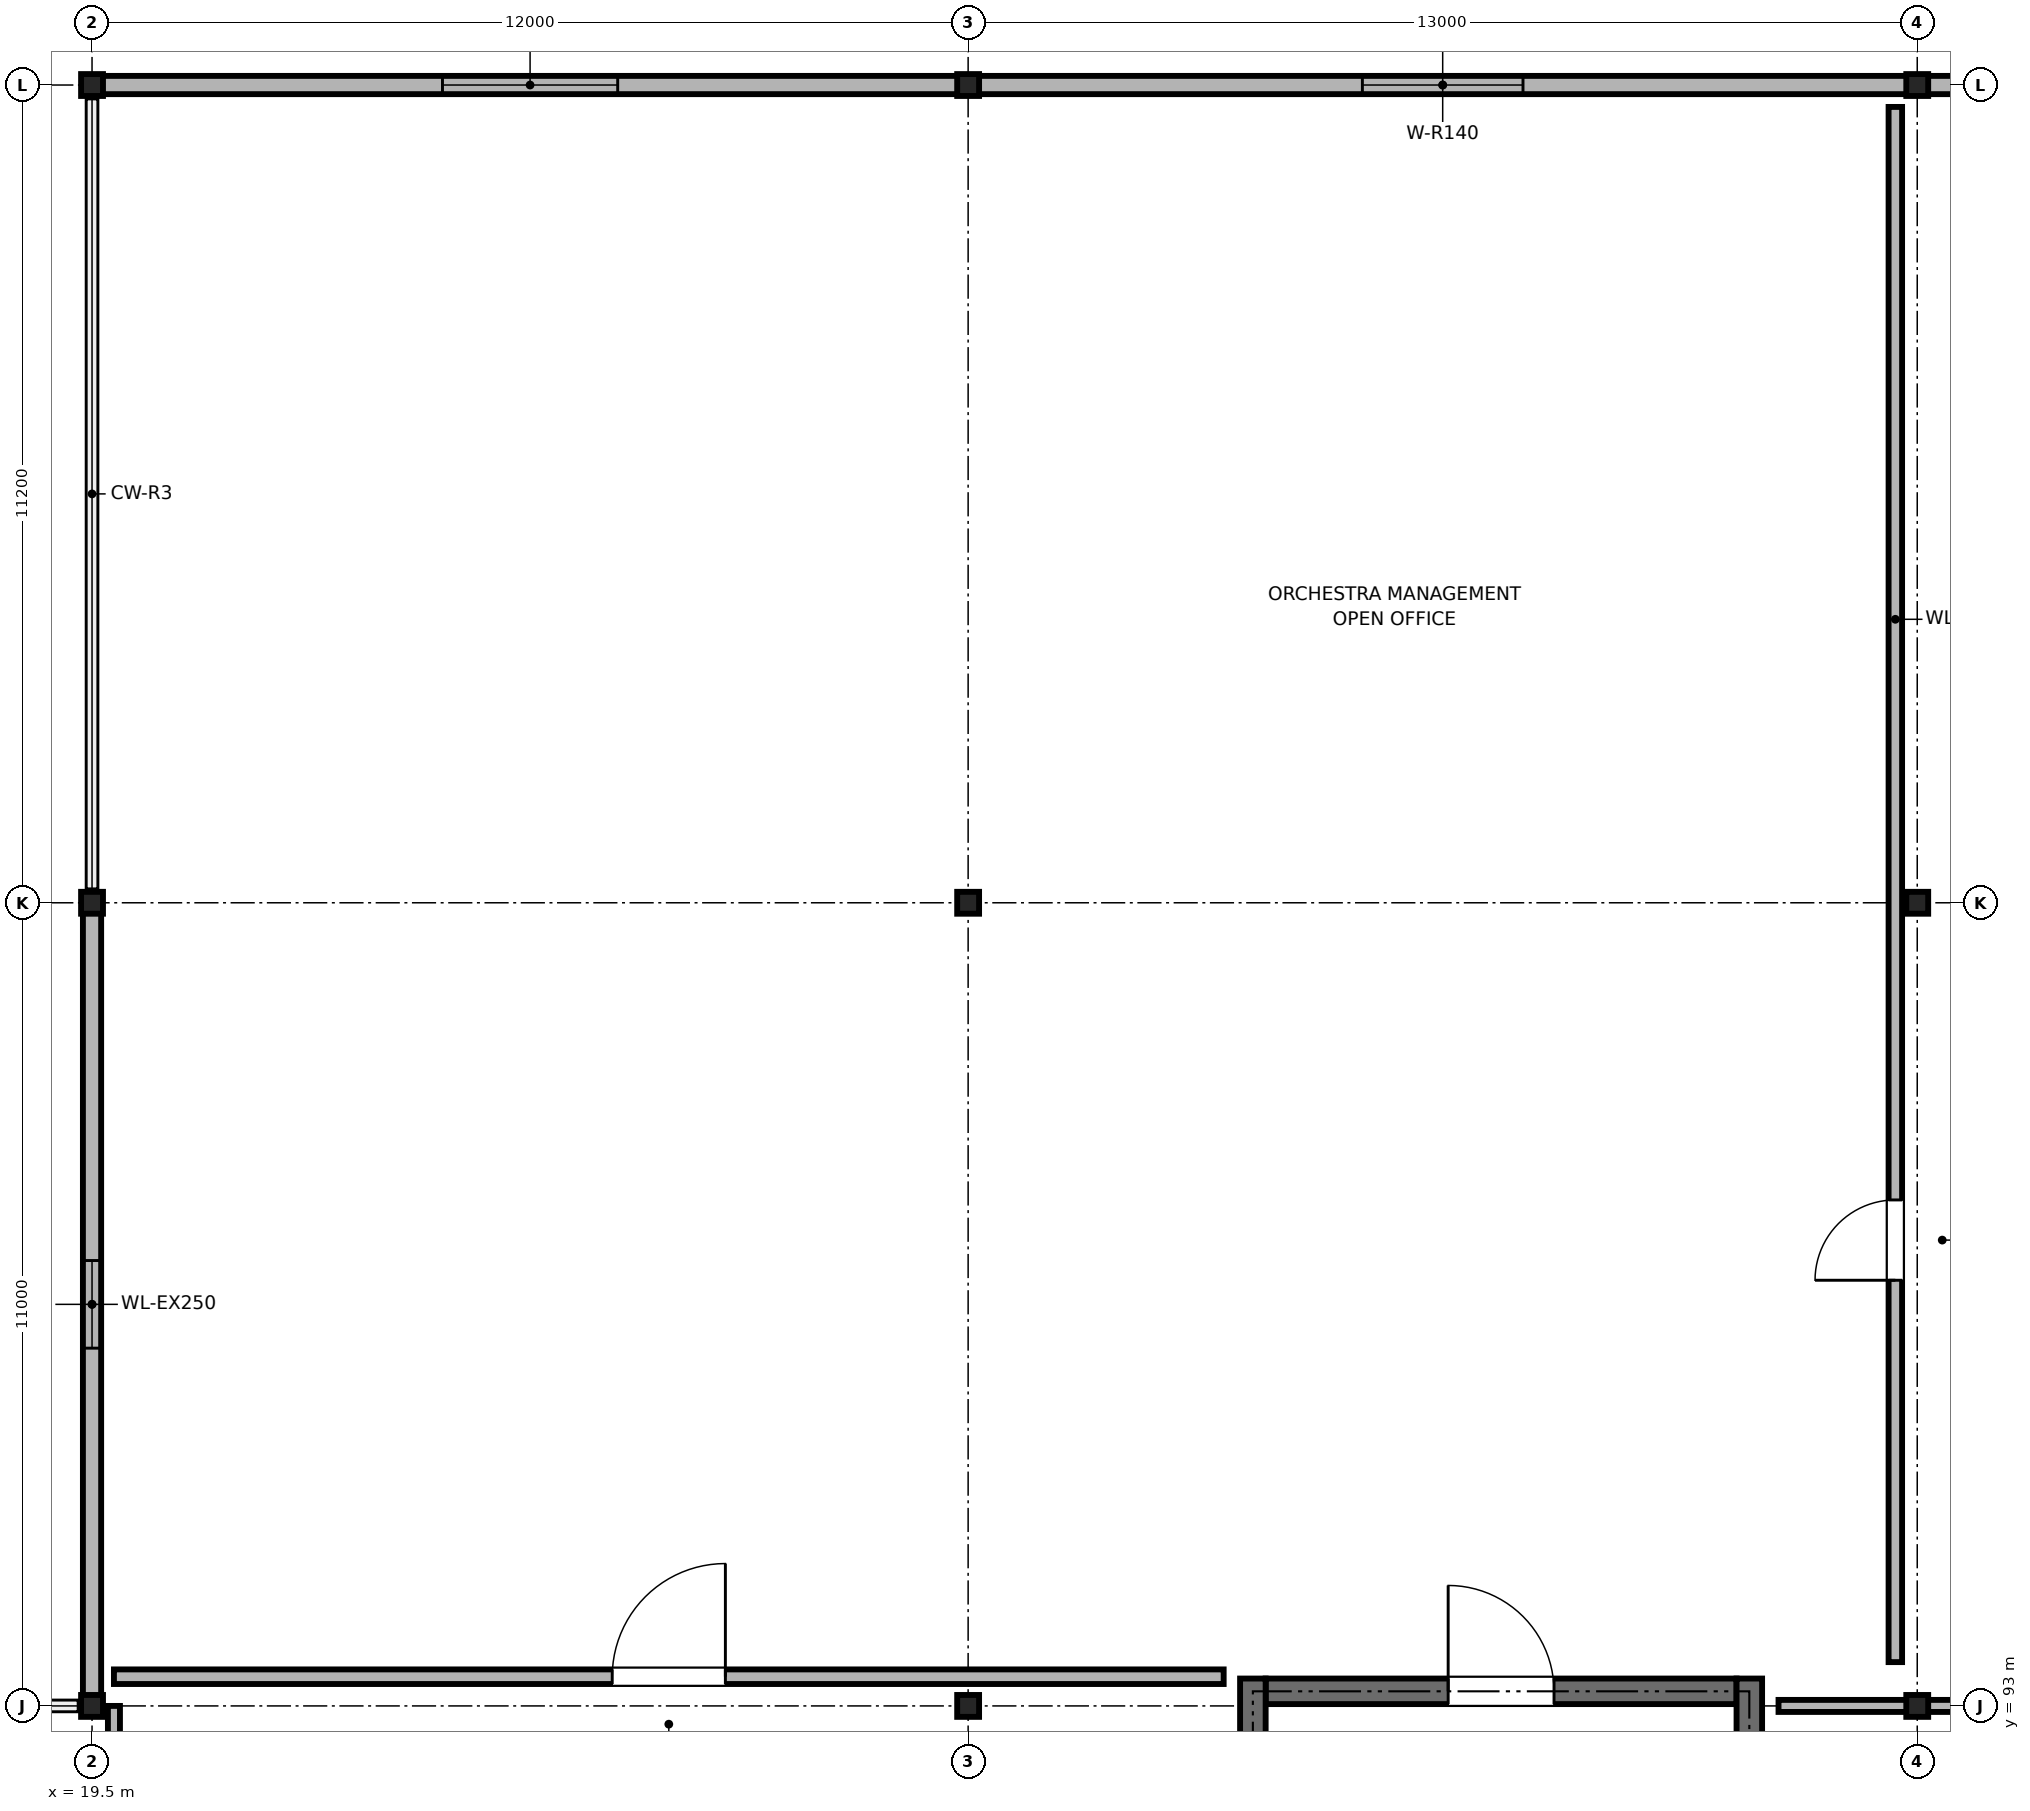
"""IFC4 building model, lengths in metres.
Left out: names, types, materials, properties, quantities, classifications, styles, units other than length and angle.
Written with IfcOpenShell. Run it as: python <this file> out.ifc"""

import sys

from ifc_helpers import new_model, si_unit, direction, frame, frame_2d, origin, origin_2d, place, context, subcontext, project, spatial, rectangle, hollow_rectangle, i_section, extrude, element, fill, save


model = new_model("IFC4")
c1 = context("Model", 3, precision=1e-05, world=origin(), true_north=direction((0.0, 1.0)))
c2 = subcontext(c1, "Body", "Model", "MODEL_VIEW")
j1 = project(units=[si_unit("LENGTHUNIT", "METRE"), si_unit("PLANEANGLEUNIT", "RADIAN")], contexts=[c1])
p1 = place(None, origin())
s1 = spatial("IfcSite", under=j1, at=p1, CompositionType="ELEMENT")
p2 = place(p1, origin())
s2 = spatial("IfcBuilding", under=s1, at=p2, CompositionType="ELEMENT")
p3 = place(p2, frame((0.0, 0.0, 9.6)))
s3 = spatial("IfcBuildingStorey", under=s2, at=p3, CompositionType="ELEMENT", Elevation=9.6)
for number, where, z_axis, x_axis in (
    (1, (19.5, 93.0, 0.0), (0.0, 0.0, 1.0), (1.0, 0.0, 0.0)),
    (2, (19.5, 104.0, 0.0), (0.0, 0.0, 1.0), (1.0, 0.0, 0.0)),
):
    element("IfcColumn", number, at=place(p3, frame(where, z_axis=z_axis, x_axis=x_axis)), inside=s3, PredefinedType="COLUMN", context=c2, shape_type="SweptSolid", body=[
        extrude(i_section(OverallWidth=0.3, OverallDepth=0.3, WebThickness=0.011, FlangeThickness=0.019, FilletRadius=0.027, at=origin_2d()), origin(), (0.0, 0.0, 1.0), 4.8),
    ])
p4 = place(p3, frame((19.5, 115.2, 0.0), z_axis=(0.0, 0.0, 1.0), x_axis=(1.0, 0.0, 0.0)))
e3 = element("IfcColumn", 3, at=p4, inside=s3, PredefinedType="COLUMN", context=c2, shape_type="SweptSolid", body=[
    extrude(hollow_rectangle(XDim=0.3, YDim=0.3, WallThickness=0.016, at=origin_2d()), origin(), (0.0, 0.0, 1.0), 4.8),
])
for number, where, z_axis, x_axis in (
    (4, (31.5, 93.0, 0.0), (0.0, 0.0, 1.0), (1.0, 0.0, 0.0)),
    (5, (31.5, 104.0, 0.0), (0.0, 0.0, 1.0), (1.0, 0.0, 0.0)),
):
    element("IfcColumn", number, at=place(p3, frame(where, z_axis=z_axis, x_axis=x_axis)), inside=s3, PredefinedType="COLUMN", context=c2, shape_type="SweptSolid", body=[
        extrude(i_section(OverallWidth=0.3, OverallDepth=0.3, WebThickness=0.011, FlangeThickness=0.019, FilletRadius=0.027, at=origin_2d()), origin(), (0.0, 0.0, 1.0), 4.8),
    ])
p5 = place(p3, frame((31.5, 115.2, 0.0), z_axis=(0.0, 0.0, 1.0), x_axis=(1.0, 0.0, 0.0)))
e6 = element("IfcColumn", 6, at=p5, inside=s3, PredefinedType="COLUMN", context=c2, shape_type="SweptSolid", body=[
    extrude(hollow_rectangle(XDim=0.3, YDim=0.3, WallThickness=0.016, at=origin_2d()), origin(), (0.0, 0.0, 1.0), 4.8),
])
p6 = place(p3, frame((44.5, 93.0, 0.0), z_axis=(0.0, 0.0, 1.0), x_axis=(1.0, 0.0, 0.0)))
e7 = element("IfcColumn", 7, at=p6, inside=s3, PredefinedType="COLUMN", context=c2, shape_type="SweptSolid", body=[
    extrude(i_section(OverallWidth=0.3, OverallDepth=0.3, WebThickness=0.011, FlangeThickness=0.019, FilletRadius=0.027, at=origin_2d()), origin(), (0.0, 0.0, 1.0), 4.8),
])
p7 = place(p3, frame((44.5, 104.0, 0.0), z_axis=(0.0, 0.0, 1.0), x_axis=(1.0, 0.0, 0.0)))
e8 = element("IfcColumn", 8, at=p7, inside=s3, PredefinedType="COLUMN", context=c2, shape_type="SweptSolid", body=[
    extrude(hollow_rectangle(XDim=0.3, YDim=0.3, WallThickness=0.016, at=origin_2d()), origin(), (0.0, 0.0, 1.0), 4.8),
])
p8 = place(p3, frame((44.5, 115.2, 0.0), z_axis=(0.0, 0.0, 1.0), x_axis=(1.0, 0.0, 0.0)))
e9 = element("IfcColumn", 9, at=p8, inside=s3, PredefinedType="COLUMN", context=c2, shape_type="SweptSolid", body=[
    extrude(i_section(OverallWidth=0.3, OverallDepth=0.3, WebThickness=0.011, FlangeThickness=0.019, FilletRadius=0.027, at=origin_2d()), origin(), (0.0, 0.0, 1.0), 4.8),
])
p9 = place(p3, frame((44.52, 115.2, 0.0), z_axis=(0.0, 0.0, 1.0), x_axis=(1.0, 0.0, 0.0)))
e10 = element("IfcWall", 10, at=p9, inside=s3, PredefinedType="SOLIDWALL", context=c2, shape_type="SweptSolid", body=[
    extrude(rectangle(XDim=12.96, YDim=0.25, at=frame_2d((6.48, 0.0))), origin(), (0.0, 0.0, 1.0), 4.088),
])
p10 = place(p9, frame((5.48, 0.0, 0.9)))
e11 = element("IfcOpeningElement", 11, at=p10, cuts=e10, PredefinedType="OPENING", context=c2, shape_type="SweptSolid", body=[
    extrude(rectangle(XDim=2.0, YDim=1.55, at=frame_2d((1.0, 0.775))), frame((0.0, 0.135, 0.0), z_axis=(0.0, -1.0, 0.0), x_axis=(1.0, 0.0, 0.0)), (0.0, 0.0, 1.0), 0.27),
])
p11 = place(p3, frame((31.52, 115.2, 0.0), z_axis=(0.0, 0.0, 1.0), x_axis=(1.0, 0.0, 0.0)))
e12 = element("IfcWall", 12, at=p11, inside=s3, PredefinedType="SOLIDWALL", context=c2, shape_type="SweptSolid", body=[
    extrude(rectangle(XDim=12.96, YDim=0.25, at=frame_2d((6.48, 0.0))), origin(), (0.0, 0.0, 1.0), 4.088),
])
p12 = place(p11, frame((5.38, 0.0, 0.9)))
e13 = element("IfcOpeningElement", 13, at=p12, cuts=e12, PredefinedType="OPENING", context=c2, shape_type="SweptSolid", body=[
    extrude(rectangle(XDim=2.2, YDim=1.55, at=frame_2d((1.1, 0.775))), frame((0.0, 0.135, 0.0), z_axis=(0.0, -1.0, 0.0), x_axis=(1.0, 0.0, 0.0)), (0.0, 0.0, 1.0), 0.27),
])
p13 = place(p3, frame((19.52, 115.2, 0.0), z_axis=(0.0, 0.0, 1.0), x_axis=(1.0, 0.0, 0.0)))
e14 = element("IfcWall", 14, at=p13, inside=s3, PredefinedType="SOLIDWALL", context=c2, shape_type="SweptSolid", body=[
    extrude(rectangle(XDim=11.96, YDim=0.25, at=frame_2d((5.98, 0.0))), origin(), (0.0, 0.0, 1.0), 4.088),
])
p14 = place(p13, frame((4.78, 0.0, 0.9)))
e15 = element("IfcOpeningElement", 15, at=p14, cuts=e14, PredefinedType="OPENING", context=c2, shape_type="SweptSolid", body=[
    extrude(rectangle(XDim=2.4, YDim=1.55, at=frame_2d((1.2, 0.775))), frame((0.0, 0.135, 0.0), z_axis=(0.0, -1.0, 0.0), x_axis=(1.0, 0.0, 0.0)), (0.0, 0.0, 1.0), 0.27),
])
p15 = place(p3, frame((19.5, 93.02, 0.0), z_axis=(0.0, 0.0, 1.0), x_axis=(0.0, 1.0, 0.0)))
e16 = element("IfcWall", 16, at=p15, inside=s3, PredefinedType="SOLIDWALL", context=c2, shape_type="SweptSolid", body=[
    extrude(rectangle(XDim=10.96, YDim=0.25, at=frame_2d((5.48, 0.0))), origin(), (0.0, 0.0, 1.0), 4.088),
])
p16 = place(p15, frame((4.88, 0.0, 0.85)))
e17 = element("IfcOpeningElement", 17, at=p16, cuts=e16, PredefinedType="OPENING", context=c2, shape_type="SweptSolid", body=[
    extrude(rectangle(XDim=1.2, YDim=1.7, at=frame_2d((0.6, 0.85))), frame((0.0, 0.135, 0.0), z_axis=(0.0, -1.0, 0.0), x_axis=(1.0, 0.0, 0.0)), (0.0, 0.0, 1.0), 0.27),
])
p17 = place(p3, frame((35.575, 93.2, 0.0), z_axis=(0.0, 0.0, 1.0), x_axis=(1.0, 0.0, 0.0)))
e18 = element("IfcWall", 18, at=p17, inside=s3, PredefinedType="SHEAR", context=c2, shape_type="SweptSolid", body=[
    extrude(rectangle(XDim=6.45, YDim=0.35, at=frame_2d((3.225, 0.0))), origin(), (0.0, 0.0, 1.0), 4.55),
])
p18 = place(p17, frame((2.5, 0.0, 0.0)))
e19 = element("IfcOpeningElement", 19, at=p18, cuts=e18, PredefinedType="OPENING", context=c2, shape_type="SweptSolid", body=[
    extrude(rectangle(XDim=1.45, YDim=2.2, at=frame_2d((0.725, 1.1))), frame((0.0, 0.185, 0.0), z_axis=(0.0, -1.0, 0.0), x_axis=(1.0, 0.0, 0.0)), (0.0, 0.0, 1.0), 0.37),
])
for number, where, z_axis, x_axis in (
    (20, (35.4, 81.775, 0.0), (0.0, 0.0, 1.0), (0.0, 1.0, 0.0)),
    (21, (42.2, 81.775, 0.0), (0.0, 0.0, 1.0), (0.0, 1.0, 0.0)),
):
    element("IfcWall", number, at=place(p3, frame(where, z_axis=z_axis, x_axis=x_axis)), inside=s3, PredefinedType="SHEAR", context=c2, shape_type="SweptSolid", body=[
        extrude(rectangle(XDim=11.6, YDim=0.35, at=frame_2d((5.8, 0.0))), origin(), (0.0, 0.0, 1.0), 4.55),
    ])
p19 = place(p3, frame((19.8, 81.6, 0.0), z_axis=(0.0, 0.0, 1.0), x_axis=(0.0, 1.0, 0.0)))
e22 = element("IfcWall", 22, at=p19, inside=s3, PredefinedType="PARTITIONING", context=c2, shape_type="SweptSolid", body=[
    extrude(rectangle(XDim=11.4, YDim=0.165, at=frame_2d((5.7, 0.0))), origin(), (0.0, 0.0, 1.0), 4.09),
])
p20 = place(p19, frame((8.257, 0.0, 0.0)))
e23 = element("IfcOpeningElement", 23, at=p20, cuts=e22, PredefinedType="OPENING", context=c2, shape_type="SweptSolid", body=[
    extrude(rectangle(XDim=1.05, YDim=2.15, at=frame_2d((0.525, 1.075))), frame((0.0, 0.093, 0.0), z_axis=(0.0, -1.0, 0.0), x_axis=(1.0, 0.0, 0.0)), (0.0, 0.0, 1.0), 0.185),
])
p21 = place(p3, frame((42.6, 93.0, 0.0), z_axis=(0.0, 0.0, 1.0), x_axis=(1.0, 0.0, 0.0)))
e24 = element("IfcWall", 24, at=p21, inside=s3, PredefinedType="PARTITIONING", context=c2, shape_type="SweptSolid", body=[
    extrude(rectangle(XDim=7.8, YDim=0.165, at=frame_2d((3.9, 0.0))), origin(), (0.0, 0.0, 1.0), 4.09),
])
p22 = place(p21, frame((3.44, 0.0, 0.0)))
e25 = element("IfcOpeningElement", 25, at=p22, cuts=e24, PredefinedType="OPENING", context=c2, shape_type="SweptSolid", body=[
    extrude(rectangle(XDim=0.92, YDim=2.1, at=frame_2d((0.46, 1.05))), frame((0.0, 0.093, 0.0), z_axis=(0.0, -1.0, 0.0), x_axis=(1.0, 0.0, 0.0)), (0.0, 0.0, 1.0), 0.185),
])
p23 = place(p3, frame((44.2, 93.6, 0.0), z_axis=(0.0, 0.0, 1.0), x_axis=(0.0, 1.0, 0.0)))
e26 = element("IfcWall", 26, at=p23, inside=s3, PredefinedType="PARTITIONING", context=c2, shape_type="SweptSolid", body=[
    extrude(rectangle(XDim=21.3, YDim=0.185, at=frame_2d((10.65, 0.0))), origin(), (0.0, 0.0, 1.0), 4.09),
])
p24 = place(p23, frame((5.23, 0.0, 0.0)))
e27 = element("IfcOpeningElement", 27, at=p24, cuts=e26, PredefinedType="OPENING", context=c2, shape_type="SweptSolid", body=[
    extrude(rectangle(XDim=1.1, YDim=2.15, at=frame_2d((0.55, 1.075))), frame((0.0, 0.103, 0.0), z_axis=(0.0, -1.0, 0.0), x_axis=(1.0, 0.0, 0.0)), (0.0, 0.0, 1.0), 0.205),
])
p25 = place(p3, frame((19.8, 93.4, 0.0), z_axis=(0.0, 0.0, 1.0), x_axis=(1.0, 0.0, 0.0)))
e28 = element("IfcWall", 28, at=p25, inside=s3, PredefinedType="PARTITIONING", context=c2, shape_type="SweptSolid", body=[
    extrude(rectangle(XDim=15.2, YDim=0.2, at=frame_2d((7.6, 0.0))), origin(), (0.0, 0.0, 1.0), 4.09),
])
p26 = place(p25, frame((6.825, 0.0, 0.0)))
e29 = element("IfcOpeningElement", 29, at=p26, cuts=e28, PredefinedType="OPENING", context=c2, shape_type="SweptSolid", body=[
    extrude(rectangle(XDim=1.55, YDim=2.18, at=frame_2d((0.775, 1.09))), frame((0.0, 0.11, 0.0), z_axis=(0.0, -1.0, 0.0), x_axis=(1.0, 0.0, 0.0)), (0.0, 0.0, 1.0), 0.22),
])
p27 = place(p12, origin())
e30 = element("IfcWindow", 30, at=p27, inside=s3, PartitioningType="SINGLE_PANEL", PredefinedType="WINDOW", context=c2, shape_type="SweptSolid", body=[
    extrude(rectangle(XDim=2.2, YDim=1.55, at=frame_2d((1.1, 0.775))), frame((0.0, 0.03, 0.0), z_axis=(0.0, -1.0, 0.0), x_axis=(1.0, 0.0, 0.0)), (0.0, 0.0, 1.0), 0.06),
])
fill(e13, e30)
p28 = place(p14, origin())
e31 = element("IfcWindow", 31, at=p28, inside=s3, PartitioningType="SINGLE_PANEL", PredefinedType="WINDOW", context=c2, shape_type="SweptSolid", body=[
    extrude(rectangle(XDim=2.4, YDim=1.55, at=frame_2d((1.2, 0.775))), frame((0.0, 0.03, 0.0), z_axis=(0.0, -1.0, 0.0), x_axis=(1.0, 0.0, 0.0)), (0.0, 0.0, 1.0), 0.06),
])
fill(e15, e31)
p29 = place(p16, origin())
e32 = element("IfcWindow", 32, at=p29, inside=s3, PartitioningType="SINGLE_PANEL", PredefinedType="WINDOW", context=c2, shape_type="SweptSolid", body=[
    extrude(rectangle(XDim=1.2, YDim=1.7, at=frame_2d((0.6, 0.85))), frame((0.0, 0.03, 0.0), z_axis=(0.0, -1.0, 0.0), x_axis=(1.0, 0.0, 0.0)), (0.0, 0.0, 1.0), 0.06),
])
fill(e17, e32)
p30 = place(p18, origin())
e33 = element("IfcDoor", 33, at=p30, inside=s3, OperationType="SINGLE_SWING_LEFT", PredefinedType="DOOR", context=c2, shape_type="SweptSolid", body=[
    extrude(rectangle(XDim=1.45, YDim=2.2, at=frame_2d((0.725, 1.1))), frame((0.0, 0.025, 0.0), z_axis=(0.0, -1.0, 0.0), x_axis=(1.0, 0.0, 0.0)), (0.0, 0.0, 1.0), 0.05),
])
fill(e19, e33)
p31 = place(p24, origin())
e34 = element("IfcDoor", 34, at=p31, inside=s3, OperationType="SINGLE_SWING_LEFT", PredefinedType="DOOR", context=c2, shape_type="SweptSolid", body=[
    extrude(rectangle(XDim=1.1, YDim=2.15, at=frame_2d((0.55, 1.075))), frame((0.0, 0.025, 0.0), z_axis=(0.0, -1.0, 0.0), x_axis=(1.0, 0.0, 0.0)), (0.0, 0.0, 1.0), 0.05),
])
fill(e27, e34)
p32 = place(p26, origin())
e35 = element("IfcDoor", 35, at=p32, inside=s3, OperationType="SINGLE_SWING_RIGHT", PredefinedType="DOOR", context=c2, shape_type="SweptSolid", body=[
    extrude(rectangle(XDim=1.55, YDim=2.18, at=frame_2d((0.775, 1.09))), frame((0.0, 0.025, 0.0), z_axis=(0.0, -1.0, 0.0), x_axis=(1.0, 0.0, 0.0)), (0.0, 0.0, 1.0), 0.05),
])
fill(e29, e35)
save(model, sys.argv[1])
